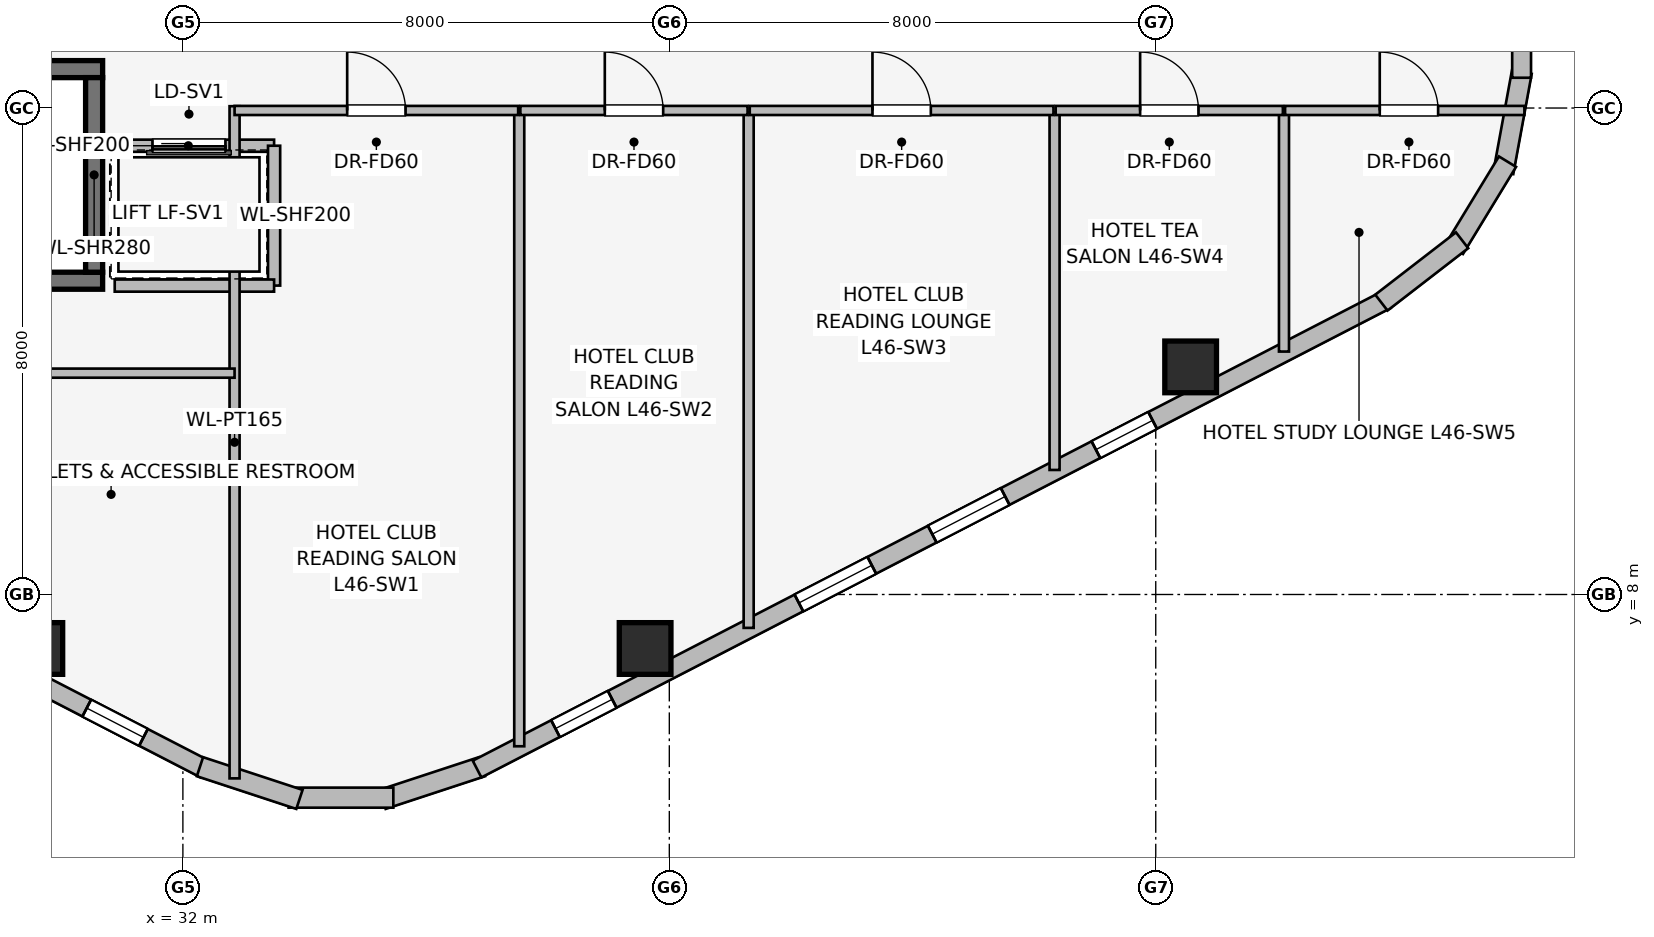
"""IFC4 building model, lengths in metres.
Left out: names, types, materials, properties, quantities, classifications, styles, units other than length and angle.
Written with IfcOpenShell. Run it as: python <this file> out.ifc"""

import sys

from ifc_helpers import new_model, si_unit, direction, frame, frame_2d, origin, origin_2d, place, context, subcontext, project, spatial, rectangle, extrude, element, fill, save


model = new_model("IFC4")
c1 = context("Model", 3, precision=1e-05, world=origin(), true_north=direction((0.0, 1.0)))
c2 = subcontext(c1, "Body", "Model", "MODEL_VIEW")
j1 = project(units=[si_unit("LENGTHUNIT", "METRE"), si_unit("PLANEANGLEUNIT", "RADIAN")], contexts=[c1])
p1 = place(None, origin())
s1 = spatial("IfcSite", under=j1, at=p1, CompositionType="ELEMENT")
p2 = place(p1, origin())
s2 = spatial("IfcBuilding", under=s1, at=p2, CompositionType="ELEMENT")
p3 = place(p2, frame((0.0, 0.0, 170.55)))
s3 = spatial("IfcBuildingStorey", under=s2, at=p3, CompositionType="ELEMENT", Elevation=170.55)
p4 = place(p3, frame((22.32, 13.16, 0.0), z_axis=(0.0, 0.0, 1.0), x_axis=(1.0, 0.0, 0.0)))
e1 = element("IfcWall", 1, at=p4, inside=s3, PredefinedType="SHEAR", context=c2, shape_type="SweptSolid", body=[
    extrude(rectangle(XDim=8.36, YDim=0.28, at=frame_2d((4.18, 0.0))), origin(), (0.0, 0.0, 1.0), 3.45),
])
p5 = place(p3, frame((30.68, 16.64, 0.0), z_axis=(0.0, 0.0, 1.0), x_axis=(-1.0, 0.0, 0.0)))
e2 = element("IfcWall", 2, at=p5, inside=s3, PredefinedType="SHEAR", context=c2, shape_type="SweptSolid", body=[
    extrude(rectangle(XDim=8.36, YDim=0.28, at=frame_2d((4.18, 0.0))), origin(), (0.0, 0.0, 1.0), 3.45),
])
p6 = place(p5, frame((6.08, 0.0, 0.0)))
e3 = element("IfcOpeningElement", 3, at=p6, cuts=e2, PredefinedType="OPENING", context=c2, shape_type="SweptSolid", body=[
    extrude(rectangle(XDim=1.05, YDim=2.0, at=frame_2d((0.525, 1.0))), frame((0.0, 0.15, 0.0), z_axis=(0.0, -1.0, 0.0), x_axis=(1.0, 0.0, 0.0)), (0.0, 0.0, 1.0), 0.3),
])
p7 = place(p3, frame((30.54, 13.3, 0.0), z_axis=(0.0, 0.0, 1.0), x_axis=(0.0, 1.0, 0.0)))
e4 = element("IfcWall", 4, at=p7, inside=s3, PredefinedType="SHEAR", context=c2, shape_type="SweptSolid", body=[
    extrude(rectangle(XDim=3.2, YDim=0.28, at=frame_2d((1.6, 0.0))), origin(), (0.0, 0.0, 1.0), 3.45),
])
for number, where, z_axis, x_axis in (
    (5, (29.598, 7.112, 0.0), (0.0, 0.0, 1.0), (1.0, 0.0, 0.0)),
    (6, (39.602, 7.112, 0.0), (0.0, 0.0, 1.0), (1.0, 0.0, 0.0)),
    (7, (48.574, 11.743, 0.0), (0.0, 0.0, 1.0), (1.0, 0.0, 0.0)),
):
    element("IfcColumn", number, at=place(p3, frame(where, z_axis=z_axis, x_axis=x_axis)), inside=s3, PredefinedType="COLUMN", context=c2, shape_type="SweptSolid", body=[
        extrude(rectangle(XDim=0.85, YDim=0.85, at=origin_2d()), origin(), (0.0, 0.0, 1.0), 3.45),
    ])
p8 = place(p3, frame((32.362, 5.129, 0.0), z_axis=(0.0, 0.0, 1.0), x_axis=(-0.888626188278, 0.458632202867, 0.0)))
e8 = element("IfcWall", 8, at=p8, inside=s3, PredefinedType="STANDARD", context=c2, shape_type="SweptSolid", body=[
    extrude(rectangle(XDim=16.828, YDim=0.31, at=frame_2d((8.414, 0.0))), origin(), (0.0, 0.0, 1.0), 3.16),
])
p9 = place(p8, frame((1.137, 0.0, 0.75)))
e9 = element("IfcOpeningElement", 9, at=p9, cuts=e8, PredefinedType="OPENING", context=c2, shape_type="SweptSolid", body=[
    extrude(rectangle(XDim=1.05, YDim=1.4, at=frame_2d((0.525, 0.7))), frame((0.0, 0.165, 0.0), z_axis=(0.0, -1.0, 0.0), x_axis=(1.0, 0.0, 0.0)), (0.0, 0.0, 1.0), 0.33),
])
p10 = place(p8, frame((4.768, 0.0, 0.75)))
e10 = element("IfcOpeningElement", 10, at=p10, cuts=e8, PredefinedType="OPENING", context=c2, shape_type="SweptSolid", body=[
    extrude(rectangle(XDim=1.35, YDim=1.45, at=frame_2d((0.675, 0.725))), frame((0.0, 0.165, 0.0), z_axis=(0.0, -1.0, 0.0), x_axis=(1.0, 0.0, 0.0)), (0.0, 0.0, 1.0), 0.33),
])
p11 = place(p8, frame((7.739, 0.0, 0.75)))
e11 = element("IfcOpeningElement", 11, at=p11, cuts=e8, PredefinedType="OPENING", context=c2, shape_type="SweptSolid", body=[
    extrude(rectangle(XDim=1.35, YDim=1.45, at=frame_2d((0.675, 0.725))), frame((0.0, 0.165, 0.0), z_axis=(0.0, -1.0, 0.0), x_axis=(1.0, 0.0, 0.0)), (0.0, 0.0, 1.0), 0.33),
])
p12 = place(p8, frame((10.71, 0.0, 0.75)))
e12 = element("IfcOpeningElement", 12, at=p12, cuts=e8, PredefinedType="OPENING", context=c2, shape_type="SweptSolid", body=[
    extrude(rectangle(XDim=1.35, YDim=1.45, at=frame_2d((0.675, 0.725))), frame((0.0, 0.165, 0.0), z_axis=(0.0, -1.0, 0.0), x_axis=(1.0, 0.0, 0.0)), (0.0, 0.0, 1.0), 0.33),
])
p13 = place(p8, frame((14.885, 0.0, 0.75)))
e13 = element("IfcOpeningElement", 13, at=p13, cuts=e8, PredefinedType="OPENING", context=c2, shape_type="SweptSolid", body=[
    extrude(rectangle(XDim=1.05, YDim=1.4, at=frame_2d((0.525, 0.7))), frame((0.0, 0.165, 0.0), z_axis=(0.0, -1.0, 0.0), x_axis=(1.0, 0.0, 0.0)), (0.0, 0.0, 1.0), 0.33),
])
p14 = place(p3, frame((36.919, 5.168, 0.0), z_axis=(0.0, 0.0, 1.0), x_axis=(-0.949937416267, -0.312440242569, 0.0)))
e14 = element("IfcWall", 14, at=p14, inside=s3, PredefinedType="STANDARD", context=c2, shape_type="SweptSolid", body=[
    extrude(rectangle(XDim=1.722, YDim=0.33, at=frame_2d((0.861, 0.0))), origin(), (0.0, 0.0, 1.0), 3.16),
])
p15 = place(p3, frame((35.461, 4.659, 0.0), z_axis=(0.0, 0.0, 1.0), x_axis=(-1.0, 0.0, 0.0)))
e15 = element("IfcWall", 15, at=p15, inside=s3, PredefinedType="STANDARD", context=c2, shape_type="SweptSolid", body=[
    extrude(rectangle(XDim=1.722, YDim=0.33, at=frame_2d((0.861, 0.0))), origin(), (0.0, 0.0, 1.0), 3.16),
])
p16 = place(p3, frame((33.917, 4.63, 0.0), z_axis=(0.0, 0.0, 1.0), x_axis=(-0.949937416267, 0.312440242569, 0.0)))
e16 = element("IfcWall", 16, at=p16, inside=s3, PredefinedType="STANDARD", context=c2, shape_type="SweptSolid", body=[
    extrude(rectangle(XDim=1.722, YDim=0.33, at=frame_2d((0.861, 0.0))), origin(), (0.0, 0.0, 1.0), 3.16),
])
p17 = place(p3, frame((51.792, 12.847, 0.0), z_axis=(0.0, 0.0, 1.0), x_axis=(-0.888626188278, -0.458632202867, 0.0)))
e17 = element("IfcWall", 17, at=p17, inside=s3, PredefinedType="STANDARD", context=c2, shape_type="SweptSolid", body=[
    extrude(rectangle(XDim=16.828, YDim=0.31, at=frame_2d((8.414, 0.0))), origin(), (0.0, 0.0, 1.0), 3.16),
])
p18 = place(p17, frame((4.325, 0.0, 0.75)))
e18 = element("IfcOpeningElement", 18, at=p18, cuts=e17, PredefinedType="OPENING", context=c2, shape_type="SweptSolid", body=[
    extrude(rectangle(XDim=1.05, YDim=1.4, at=frame_2d((0.525, 0.7))), frame((0.0, 0.165, 0.0), z_axis=(0.0, -1.0, 0.0), x_axis=(1.0, 0.0, 0.0)), (0.0, 0.0, 1.0), 0.33),
])
p19 = place(p17, frame((7.054, 0.0, 0.75)))
e19 = element("IfcOpeningElement", 19, at=p19, cuts=e17, PredefinedType="OPENING", context=c2, shape_type="SweptSolid", body=[
    extrude(rectangle(XDim=1.35, YDim=1.45, at=frame_2d((0.675, 0.725))), frame((0.0, 0.165, 0.0), z_axis=(0.0, -1.0, 0.0), x_axis=(1.0, 0.0, 0.0)), (0.0, 0.0, 1.0), 0.33),
])
p20 = place(p17, frame((9.522, 0.0, 0.75)))
e20 = element("IfcOpeningElement", 20, at=p20, cuts=e17, PredefinedType="OPENING", context=c2, shape_type="SweptSolid", body=[
    extrude(rectangle(XDim=1.35, YDim=1.45, at=frame_2d((0.675, 0.725))), frame((0.0, 0.165, 0.0), z_axis=(0.0, -1.0, 0.0), x_axis=(1.0, 0.0, 0.0)), (0.0, 0.0, 1.0), 0.33),
])
p21 = place(p17, frame((14.327, 0.0, 0.75)))
e21 = element("IfcOpeningElement", 21, at=p21, cuts=e17, PredefinedType="OPENING", context=c2, shape_type="SweptSolid", body=[
    extrude(rectangle(XDim=1.05, YDim=1.4, at=frame_2d((0.525, 0.7))), frame((0.0, 0.165, 0.0), z_axis=(0.0, -1.0, 0.0), x_axis=(1.0, 0.0, 0.0)), (0.0, 0.0, 1.0), 0.33),
])
p22 = place(p3, frame((54.021, 16.592, 0.0), z_axis=(0.0, 0.0, 1.0), x_axis=(-0.180717642671, -0.983535019014, 0.0)))
e22 = element("IfcWall", 22, at=p22, inside=s3, PredefinedType="STANDARD", context=c2, shape_type="SweptSolid", body=[
    extrude(rectangle(XDim=1.677, YDim=0.33, at=frame_2d((0.838, 0.0))), origin(), (0.0, 0.0, 1.0), 3.16),
])
p23 = place(p3, frame((53.785, 15.118, 0.0), z_axis=(0.0, 0.0, 1.0), x_axis=(-0.520219286058, -0.85403272444, 0.0)))
e23 = element("IfcWall", 23, at=p23, inside=s3, PredefinedType="STANDARD", context=c2, shape_type="SweptSolid", body=[
    extrude(rectangle(XDim=1.678, YDim=0.33, at=frame_2d((0.839, 0.0))), origin(), (0.0, 0.0, 1.0), 3.16),
])
p24 = place(p3, frame((53.038, 13.825, 0.0), z_axis=(0.0, 0.0, 1.0), x_axis=(-0.791464279355, -0.611215423976, 0.0)))
e24 = element("IfcWall", 24, at=p24, inside=s3, PredefinedType="STANDARD", context=c2, shape_type="SweptSolid", body=[
    extrude(rectangle(XDim=1.677, YDim=0.33, at=frame_2d((0.838, 0.0))), origin(), (0.0, 0.0, 1.0), 3.16),
])
p25 = place(p3, frame((54.017, 31.502, 0.0), z_axis=(0.0, 0.0, 1.0), x_axis=(0.0, -1.0, 0.0)))
e25 = element("IfcWall", 25, at=p25, inside=s3, PredefinedType="STANDARD", context=c2, shape_type="SweptSolid", body=[
    extrude(rectangle(XDim=15.004, YDim=0.31, at=frame_2d((7.502, 0.0))), origin(), (0.0, 0.0, 1.0), 3.16),
])
p26 = place(p25, frame((4.353, 0.0, 0.75)))
e26 = element("IfcOpeningElement", 26, at=p26, cuts=e25, PredefinedType="OPENING", context=c2, shape_type="SweptSolid", body=[
    extrude(rectangle(XDim=2.0, YDim=1.5, at=frame_2d((1.0, 0.75))), frame((0.0, 0.165, 0.0), z_axis=(0.0, -1.0, 0.0), x_axis=(1.0, 0.0, 0.0)), (0.0, 0.0, 1.0), 0.33),
])
p27 = place(p25, frame((8.083, 0.0, 0.75)))
e27 = element("IfcOpeningElement", 27, at=p27, cuts=e25, PredefinedType="OPENING", context=c2, shape_type="SweptSolid", body=[
    extrude(rectangle(XDim=1.35, YDim=1.45, at=frame_2d((0.675, 0.725))), frame((0.0, 0.165, 0.0), z_axis=(0.0, -1.0, 0.0), x_axis=(1.0, 0.0, 0.0)), (0.0, 0.0, 1.0), 0.33),
])
p28 = place(p25, frame((9.87, 0.0, 0.75)))
e28 = element("IfcOpeningElement", 28, at=p28, cuts=e25, PredefinedType="OPENING", context=c2, shape_type="SweptSolid", body=[
    extrude(rectangle(XDim=1.35, YDim=1.45, at=frame_2d((0.675, 0.725))), frame((0.0, 0.165, 0.0), z_axis=(0.0, -1.0, 0.0), x_axis=(1.0, 0.0, 0.0)), (0.0, 0.0, 1.0), 0.33),
])
p29 = place(p3, frame((33.5, 15.38, 0.0), z_axis=(0.0, 0.0, 1.0), x_axis=(-1.0, 0.0, 0.0)))
e29 = element("IfcWall", 29, at=p29, inside=s3, PredefinedType="PARTITIONING", context=c2, shape_type="SweptSolid", body=[
    extrude(rectangle(XDim=2.82, YDim=0.2, at=frame_2d((1.41, 0.0))), origin(), (0.0, 0.0, 1.0), 3.16),
])
p30 = place(p29, frame((0.8, 0.0, 0.0)))
e30 = element("IfcOpeningElement", 30, at=p30, cuts=e29, PredefinedType="OPENING", context=c2, shape_type="SweptSolid", body=[
    extrude(rectangle(XDim=1.2, YDim=2.2, at=frame_2d((0.6, 1.1))), frame((0.0, 0.11, 0.0), z_axis=(0.0, -1.0, 0.0), x_axis=(1.0, 0.0, 0.0)), (0.0, 0.0, 1.0), 0.22),
])
p31 = place(p3, frame((33.5, 13.08, 0.0), z_axis=(0.0, 0.0, 1.0), x_axis=(0.0, 1.0, 0.0)))
e31 = element("IfcWall", 31, at=p31, inside=s3, PredefinedType="PARTITIONING", context=c2, shape_type="SweptSolid", body=[
    extrude(rectangle(XDim=2.3, YDim=0.2, at=frame_2d((1.15, 0.0))), origin(), (0.0, 0.0, 1.0), 3.16),
])
p32 = place(p3, frame((30.879, 13.08, 0.0), z_axis=(0.0, 0.0, 1.0), x_axis=(1.0, 0.0, 0.0)))
e32 = element("IfcWall", 32, at=p32, inside=s3, PredefinedType="PARTITIONING", context=c2, shape_type="SweptSolid", body=[
    extrude(rectangle(XDim=2.621, YDim=0.2, at=frame_2d((1.311, 0.0))), origin(), (0.0, 0.0, 1.0), 3.16),
])
p33 = place(p3, frame((32.85, 4.976, 0.0), z_axis=(0.0, 0.0, 1.0), x_axis=(0.0, 1.0, 0.0)))
e33 = element("IfcWall", 33, at=p33, inside=s3, PredefinedType="PARTITIONING", context=c2, shape_type="SweptSolid", body=[
    extrude(rectangle(XDim=11.054, YDim=0.165, at=frame_2d((5.527, 0.0))), origin(), (0.0, 0.0, 1.0), 3.16),
])
p34 = place(p3, frame((19.757, 11.64, 0.0), z_axis=(0.0, 0.0, 1.0), x_axis=(1.0, 0.0, 0.0)))
e34 = element("IfcWall", 34, at=p34, inside=s3, PredefinedType="PARTITIONING", context=c2, shape_type="SweptSolid", body=[
    extrude(rectangle(XDim=13.093, YDim=0.15, at=frame_2d((6.546, 0.0))), origin(), (0.0, 0.0, 1.0), 3.16),
])
p35 = place(p34, frame((3.243, 0.0, 0.0)))
e35 = element("IfcOpeningElement", 35, at=p35, cuts=e34, PredefinedType="OPENING", context=c2, shape_type="SweptSolid", body=[
    extrude(rectangle(XDim=0.9, YDim=2.0, at=frame_2d((0.45, 1.0))), frame((0.0, 0.085, 0.0), z_axis=(0.0, -1.0, 0.0), x_axis=(1.0, 0.0, 0.0)), (0.0, 0.0, 1.0), 0.17),
])
p36 = place(p3, frame((37.532, 5.504, 0.0), z_axis=(0.0, 0.0, 1.0), x_axis=(0.0, 1.0, 0.0)))
e36 = element("IfcWall", 36, at=p36, inside=s3, PredefinedType="PARTITIONING", context=c2, shape_type="SweptSolid", body=[
    extrude(rectangle(XDim=10.426, YDim=0.165, at=frame_2d((5.213, 0.0))), origin(), (0.0, 0.0, 1.0), 3.16),
])
p37 = place(p3, frame((41.305, 7.451, 0.0), z_axis=(0.0, 0.0, 1.0), x_axis=(0.0, 1.0, 0.0)))
e37 = element("IfcWall", 37, at=p37, inside=s3, PredefinedType="PARTITIONING", context=c2, shape_type="SweptSolid", body=[
    extrude(rectangle(XDim=8.479, YDim=0.165, at=frame_2d((4.24, 0.0))), origin(), (0.0, 0.0, 1.0), 3.16),
])
p38 = place(p3, frame((46.336, 10.048, 0.0), z_axis=(0.0, 0.0, 1.0), x_axis=(0.0, 1.0, 0.0)))
e38 = element("IfcWall", 38, at=p38, inside=s3, PredefinedType="PARTITIONING", context=c2, shape_type="SweptSolid", body=[
    extrude(rectangle(XDim=5.882, YDim=0.165, at=frame_2d((2.941, 0.0))), origin(), (0.0, 0.0, 1.0), 3.16),
])
p39 = place(p3, frame((50.109, 11.995, 0.0), z_axis=(0.0, 0.0, 1.0), x_axis=(0.0, 1.0, 0.0)))
e39 = element("IfcWall", 39, at=p39, inside=s3, PredefinedType="PARTITIONING", context=c2, shape_type="SweptSolid", body=[
    extrude(rectangle(XDim=3.935, YDim=0.165, at=frame_2d((1.967, 0.0))), origin(), (0.0, 0.0, 1.0), 3.16),
])
p40 = place(p3, frame((32.85, 15.96, 0.0), z_axis=(0.0, 0.0, 1.0), x_axis=(1.0, 0.0, 0.0)))
e40 = element("IfcWall", 40, at=p40, inside=s3, PredefinedType="PARTITIONING", context=c2, shape_type="SweptSolid", body=[
    extrude(rectangle(XDim=4.664, YDim=0.15, at=frame_2d((2.332, 0.0))), origin(), (0.0, 0.0, 1.0), 3.16),
])
p41 = place(p40, frame((1.852, 0.0, 0.0)))
e41 = element("IfcOpeningElement", 41, at=p41, cuts=e40, PredefinedType="OPENING", context=c2, shape_type="SweptSolid", body=[
    extrude(rectangle(XDim=0.96, YDim=2.0, at=frame_2d((0.48, 1.0))), frame((0.0, 0.085, 0.0), z_axis=(0.0, -1.0, 0.0), x_axis=(1.0, 0.0, 0.0)), (0.0, 0.0, 1.0), 0.17),
])
p42 = place(p3, frame((37.55, 15.96, 0.0), z_axis=(0.0, 0.0, 1.0), x_axis=(1.0, 0.0, 0.0)))
e42 = element("IfcWall", 42, at=p42, inside=s3, PredefinedType="PARTITIONING", context=c2, shape_type="SweptSolid", body=[
    extrude(rectangle(XDim=3.737, YDim=0.15, at=frame_2d((1.869, 0.0))), origin(), (0.0, 0.0, 1.0), 3.16),
])
p43 = place(p42, frame((1.389, 0.0, 0.0)))
e43 = element("IfcOpeningElement", 43, at=p43, cuts=e42, PredefinedType="OPENING", context=c2, shape_type="SweptSolid", body=[
    extrude(rectangle(XDim=0.96, YDim=2.0, at=frame_2d((0.48, 1.0))), frame((0.0, 0.085, 0.0), z_axis=(0.0, -1.0, 0.0), x_axis=(1.0, 0.0, 0.0)), (0.0, 0.0, 1.0), 0.17),
])
p44 = place(p3, frame((41.323, 15.96, 0.0), z_axis=(0.0, 0.0, 1.0), x_axis=(1.0, 0.0, 0.0)))
e44 = element("IfcWall", 44, at=p44, inside=s3, PredefinedType="PARTITIONING", context=c2, shape_type="SweptSolid", body=[
    extrude(rectangle(XDim=4.995, YDim=0.15, at=frame_2d((2.498, 0.0))), origin(), (0.0, 0.0, 1.0), 3.16),
])
p45 = place(p44, frame((2.018, 0.0, 0.0)))
e45 = element("IfcOpeningElement", 45, at=p45, cuts=e44, PredefinedType="OPENING", context=c2, shape_type="SweptSolid", body=[
    extrude(rectangle(XDim=0.96, YDim=2.0, at=frame_2d((0.48, 1.0))), frame((0.0, 0.085, 0.0), z_axis=(0.0, -1.0, 0.0), x_axis=(1.0, 0.0, 0.0)), (0.0, 0.0, 1.0), 0.17),
])
p46 = place(p3, frame((46.354, 15.96, 0.0), z_axis=(0.0, 0.0, 1.0), x_axis=(1.0, 0.0, 0.0)))
e46 = element("IfcWall", 46, at=p46, inside=s3, PredefinedType="PARTITIONING", context=c2, shape_type="SweptSolid", body=[
    extrude(rectangle(XDim=3.737, YDim=0.15, at=frame_2d((1.869, 0.0))), origin(), (0.0, 0.0, 1.0), 3.16),
])
p47 = place(p46, frame((1.389, 0.0, 0.0)))
e47 = element("IfcOpeningElement", 47, at=p47, cuts=e46, PredefinedType="OPENING", context=c2, shape_type="SweptSolid", body=[
    extrude(rectangle(XDim=0.96, YDim=2.0, at=frame_2d((0.48, 1.0))), frame((0.0, 0.085, 0.0), z_axis=(0.0, -1.0, 0.0), x_axis=(1.0, 0.0, 0.0)), (0.0, 0.0, 1.0), 0.17),
])
p48 = place(p3, frame((50.127, 15.96, 0.0), z_axis=(0.0, 0.0, 1.0), x_axis=(1.0, 0.0, 0.0)))
e48 = element("IfcWall", 48, at=p48, inside=s3, PredefinedType="PARTITIONING", context=c2, shape_type="SweptSolid", body=[
    extrude(rectangle(XDim=3.936, YDim=0.15, at=frame_2d((1.968, 0.0))), origin(), (0.0, 0.0, 1.0), 3.16),
])
p49 = place(p48, frame((1.557, 0.0, 0.0)))
e49 = element("IfcOpeningElement", 49, at=p49, cuts=e48, PredefinedType="OPENING", context=c2, shape_type="SweptSolid", body=[
    extrude(rectangle(XDim=0.96, YDim=2.0, at=frame_2d((0.48, 1.0))), frame((0.0, 0.085, 0.0), z_axis=(0.0, -1.0, 0.0), x_axis=(1.0, 0.0, 0.0)), (0.0, 0.0, 1.0), 0.17),
])
p50 = place(p9, origin())
e50 = element("IfcWindow", 50, at=p50, inside=s3, PartitioningType="SINGLE_PANEL", PredefinedType="WINDOW", context=c2, shape_type="SweptSolid", body=[
    extrude(rectangle(XDim=1.05, YDim=1.4, at=frame_2d((0.525, 0.7))), frame((0.0, 0.03, 0.0), z_axis=(0.0, -1.0, 0.0), x_axis=(1.0, 0.0, 0.0)), (0.0, 0.0, 1.0), 0.06),
])
fill(e9, e50)
p51 = place(p18, origin())
e51 = element("IfcWindow", 51, at=p51, inside=s3, PartitioningType="SINGLE_PANEL", PredefinedType="WINDOW", context=c2, shape_type="SweptSolid", body=[
    extrude(rectangle(XDim=1.05, YDim=1.4, at=frame_2d((0.525, 0.7))), frame((0.0, 0.03, 0.0), z_axis=(0.0, -1.0, 0.0), x_axis=(1.0, 0.0, 0.0)), (0.0, 0.0, 1.0), 0.06),
])
fill(e18, e51)
p52 = place(p19, origin())
e52 = element("IfcWindow", 52, at=p52, inside=s3, PartitioningType="SINGLE_PANEL", PredefinedType="WINDOW", context=c2, shape_type="SweptSolid", body=[
    extrude(rectangle(XDim=1.35, YDim=1.45, at=frame_2d((0.675, 0.725))), frame((0.0, 0.03, 0.0), z_axis=(0.0, -1.0, 0.0), x_axis=(1.0, 0.0, 0.0)), (0.0, 0.0, 1.0), 0.06),
])
fill(e19, e52)
p53 = place(p20, origin())
e53 = element("IfcWindow", 53, at=p53, inside=s3, PartitioningType="SINGLE_PANEL", PredefinedType="WINDOW", context=c2, shape_type="SweptSolid", body=[
    extrude(rectangle(XDim=1.35, YDim=1.45, at=frame_2d((0.675, 0.725))), frame((0.0, 0.03, 0.0), z_axis=(0.0, -1.0, 0.0), x_axis=(1.0, 0.0, 0.0)), (0.0, 0.0, 1.0), 0.06),
])
fill(e20, e53)
p54 = place(p21, origin())
e54 = element("IfcWindow", 54, at=p54, inside=s3, PartitioningType="SINGLE_PANEL", PredefinedType="WINDOW", context=c2, shape_type="SweptSolid", body=[
    extrude(rectangle(XDim=1.05, YDim=1.4, at=frame_2d((0.525, 0.7))), frame((0.0, 0.03, 0.0), z_axis=(0.0, -1.0, 0.0), x_axis=(1.0, 0.0, 0.0)), (0.0, 0.0, 1.0), 0.06),
])
fill(e21, e54)
p55 = place(p30, origin())
e55 = element("IfcDoor", 55, at=p55, inside=s3, OperationType="SLIDING_TO_RIGHT", PredefinedType="DOOR", context=c2, shape_type="SweptSolid", body=[
    extrude(rectangle(XDim=1.2, YDim=2.2, at=frame_2d((0.6, 1.1))), frame((0.0, 0.025, 0.0), z_axis=(0.0, -1.0, 0.0), x_axis=(1.0, 0.0, 0.0)), (0.0, 0.0, 1.0), 0.05),
])
fill(e30, e55)
p56 = place(p41, origin())
e56 = element("IfcDoor", 56, at=p56, inside=s3, OperationType="SINGLE_SWING_LEFT", PredefinedType="DOOR", context=c2, shape_type="SweptSolid", body=[
    extrude(rectangle(XDim=0.96, YDim=2.0, at=frame_2d((0.48, 1.0))), frame((0.0, 0.025, 0.0), z_axis=(0.0, -1.0, 0.0), x_axis=(1.0, 0.0, 0.0)), (0.0, 0.0, 1.0), 0.05),
])
fill(e41, e56)
p57 = place(p43, origin())
e57 = element("IfcDoor", 57, at=p57, inside=s3, OperationType="SINGLE_SWING_LEFT", PredefinedType="DOOR", context=c2, shape_type="SweptSolid", body=[
    extrude(rectangle(XDim=0.96, YDim=2.0, at=frame_2d((0.48, 1.0))), frame((0.0, 0.025, 0.0), z_axis=(0.0, -1.0, 0.0), x_axis=(1.0, 0.0, 0.0)), (0.0, 0.0, 1.0), 0.05),
])
fill(e43, e57)
p58 = place(p45, origin())
e58 = element("IfcDoor", 58, at=p58, inside=s3, OperationType="SINGLE_SWING_LEFT", PredefinedType="DOOR", context=c2, shape_type="SweptSolid", body=[
    extrude(rectangle(XDim=0.96, YDim=2.0, at=frame_2d((0.48, 1.0))), frame((0.0, 0.025, 0.0), z_axis=(0.0, -1.0, 0.0), x_axis=(1.0, 0.0, 0.0)), (0.0, 0.0, 1.0), 0.05),
])
fill(e45, e58)
p59 = place(p47, origin())
e59 = element("IfcDoor", 59, at=p59, inside=s3, OperationType="SINGLE_SWING_LEFT", PredefinedType="DOOR", context=c2, shape_type="SweptSolid", body=[
    extrude(rectangle(XDim=0.96, YDim=2.0, at=frame_2d((0.48, 1.0))), frame((0.0, 0.025, 0.0), z_axis=(0.0, -1.0, 0.0), x_axis=(1.0, 0.0, 0.0)), (0.0, 0.0, 1.0), 0.05),
])
fill(e47, e59)
p60 = place(p49, origin())
e60 = element("IfcDoor", 60, at=p60, inside=s3, OperationType="SINGLE_SWING_LEFT", PredefinedType="DOOR", context=c2, shape_type="SweptSolid", body=[
    extrude(rectangle(XDim=0.96, YDim=2.0, at=frame_2d((0.48, 1.0))), frame((0.0, 0.025, 0.0), z_axis=(0.0, -1.0, 0.0), x_axis=(1.0, 0.0, 0.0)), (0.0, 0.0, 1.0), 0.05),
])
fill(e49, e60)
save(model, sys.argv[1])
